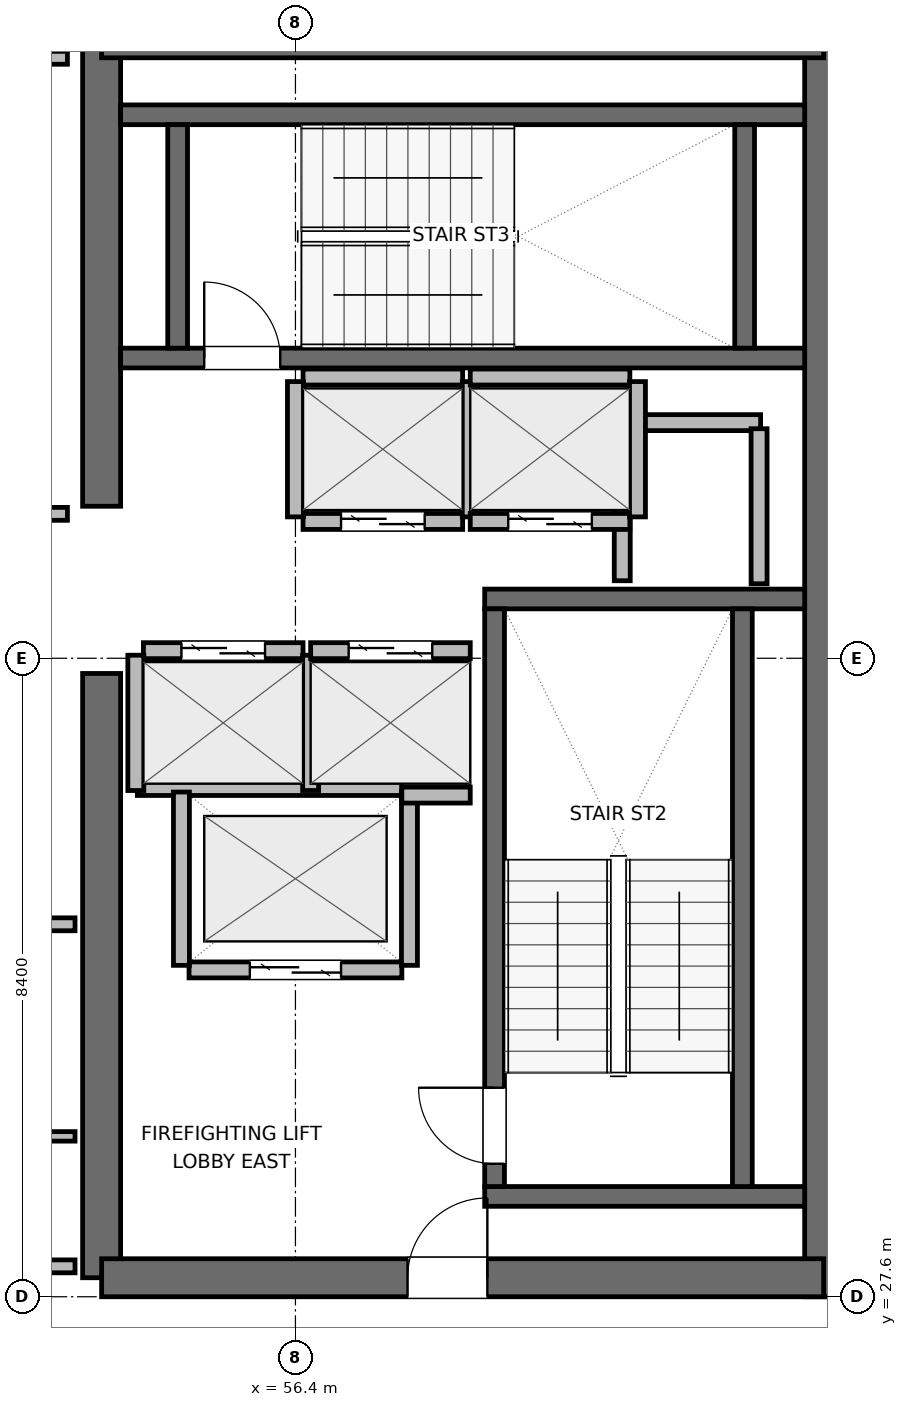
"""IFC4 building model, lengths in metres.
Left out: names, types, materials, properties, quantities, classifications, styles, units other than length and angle.
Written with IfcOpenShell. Run it as: python <this file> out.ifc"""

import sys

from ifc_helpers import new_model, si_unit, direction, frame, frame_2d, origin, place, context, subcontext, project, spatial, rectangle, extrude, element, fill, save


model = new_model("IFC4")
c1 = context("Model", 3, precision=1e-05, world=origin(), true_north=direction((0.0, 1.0)))
c2 = subcontext(c1, "Body", "Model", "MODEL_VIEW")
j1 = project(units=[si_unit("LENGTHUNIT", "METRE"), si_unit("PLANEANGLEUNIT", "RADIAN")], contexts=[c1])
p1 = place(None, origin())
s1 = spatial("IfcSite", under=j1, at=p1, CompositionType="ELEMENT")
p2 = place(p1, origin())
s2 = spatial("IfcBuilding", under=s1, at=p2, CompositionType="ELEMENT")
p3 = place(p2, frame((0.0, 0.0, 262.8)))
s3 = spatial("IfcBuildingStorey", under=s2, at=p3, CompositionType="ELEMENT", Elevation=262.8)
p4 = place(p3, frame((53.85, 27.85, 0.0), z_axis=(0.0, 0.0, 1.0), x_axis=(0.0, 1.0, 0.0)))
e1 = element("IfcWall", 1, at=p4, inside=s3, PredefinedType="SHEAR", context=c2, shape_type="SweptSolid", body=[
    extrude(rectangle(XDim=7.95, YDim=0.5, at=frame_2d((3.975, 0.0))), origin(), (0.0, 0.0, 1.0), 3.9),
])
p5 = place(p3, frame((53.85, 38.0, 0.0), z_axis=(0.0, 0.0, 1.0), x_axis=(0.0, 1.0, 0.0)))
e2 = element("IfcWall", 2, at=p5, inside=s3, PredefinedType="SHEAR", context=c2, shape_type="SweptSolid", body=[
    extrude(rectangle(XDim=6.15, YDim=0.5, at=frame_2d((3.075, 0.0))), origin(), (0.0, 0.0, 1.0), 3.9),
])
p6 = place(p3, frame((63.35, 27.6, 0.0), z_axis=(0.0, 0.0, 1.0), x_axis=(0.0, 1.0, 0.0)))
e3 = element("IfcWall", 3, at=p6, inside=s3, PredefinedType="SHEAR", context=c2, shape_type="SweptSolid", body=[
    extrude(rectangle(XDim=16.8, YDim=0.5, at=frame_2d((8.4, 0.0))), origin(), (0.0, 0.0, 1.0), 3.9),
])
p7 = place(p3, frame((53.85, 27.85, 0.0), z_axis=(0.0, 0.0, 1.0), x_axis=(1.0, 0.0, 0.0)))
e4 = element("IfcWall", 4, at=p7, inside=s3, PredefinedType="SHEAR", context=c2, shape_type="SweptSolid", body=[
    extrude(rectangle(XDim=9.5, YDim=0.5, at=frame_2d((4.75, 0.0))), origin(), (0.0, 0.0, 1.0), 3.9),
])
p8 = place(p7, frame((4.025, 0.0, 0.0)))
e5 = element("IfcOpeningElement", 5, at=p8, cuts=e4, PredefinedType="OPENING", context=c2, shape_type="SweptSolid", body=[
    extrude(rectangle(XDim=1.05, YDim=2.04, at=frame_2d((0.525, 1.02))), frame((0.0, 0.26, 0.0), z_axis=(0.0, -1.0, 0.0), x_axis=(1.0, 0.0, 0.0)), (0.0, 0.0, 1.0), 0.52),
])
p9 = place(p3, frame((53.85, 44.15, 0.0), z_axis=(0.0, 0.0, 1.0), x_axis=(1.0, 0.0, 0.0)))
e6 = element("IfcWall", 6, at=p9, inside=s3, PredefinedType="SHEAR", context=c2, shape_type="SweptSolid", body=[
    extrude(rectangle(XDim=9.5, YDim=0.5, at=frame_2d((4.75, 0.0))), origin(), (0.0, 0.0, 1.0), 3.9),
])
for number, where, z_axis, x_axis in (
    (7, (58.89, 28.92, 0.0), (0.0, 0.0, 1.0), (1.0, 0.0, 0.0)),
    (8, (58.89, 36.78, 0.0), (0.0, 0.0, 1.0), (1.0, 0.0, 0.0)),
):
    element("IfcWall", number, at=place(p3, frame(where, z_axis=z_axis, x_axis=x_axis)), inside=s3, PredefinedType="SHEAR", context=c2, shape_type="SweptSolid", body=[
        extrude(rectangle(XDim=4.21, YDim=0.26, at=frame_2d((2.105, 0.0))), origin(), (0.0, 0.0, 1.0), 3.9),
    ])
p10 = place(p3, frame((59.02, 29.05, 0.0), z_axis=(0.0, 0.0, 1.0), x_axis=(0.0, 1.0, 0.0)))
e9 = element("IfcWall", 9, at=p10, inside=s3, PredefinedType="SHEAR", context=c2, shape_type="SweptSolid", body=[
    extrude(rectangle(XDim=7.6, YDim=0.26, at=frame_2d((3.8, 0.0))), origin(), (0.0, 0.0, 1.0), 3.9),
])
p11 = place(p10, frame((0.3, 0.0, 0.0)))
e10 = element("IfcOpeningElement", 10, at=p11, cuts=e9, PredefinedType="OPENING", context=c2, shape_type="SweptSolid", body=[
    extrude(rectangle(XDim=1.0, YDim=2.04, at=frame_2d((0.5, 1.02))), frame((0.0, 0.14, 0.0), z_axis=(0.0, -1.0, 0.0), x_axis=(1.0, 0.0, 0.0)), (0.0, 0.0, 1.0), 0.28),
])
p12 = place(p3, frame((62.28, 29.05, 0.0), z_axis=(0.0, 0.0, 1.0), x_axis=(0.0, 1.0, 0.0)))
e11 = element("IfcWall", 11, at=p12, inside=s3, PredefinedType="SHEAR", context=c2, shape_type="SweptSolid", body=[
    extrude(rectangle(XDim=7.6, YDim=0.26, at=frame_2d((3.8, 0.0))), origin(), (0.0, 0.0, 1.0), 3.9),
])
p13 = place(p3, frame((54.1, 39.95, 0.0), z_axis=(0.0, 0.0, 1.0), x_axis=(1.0, 0.0, 0.0)))
e12 = element("IfcWall", 12, at=p13, inside=s3, PredefinedType="SHEAR", context=c2, shape_type="SweptSolid", body=[
    extrude(rectangle(XDim=9.0, YDim=0.26, at=frame_2d((4.5, 0.0))), origin(), (0.0, 0.0, 1.0), 3.9),
])
p14 = place(p13, frame((1.1, 0.0, 0.0)))
e13 = element("IfcOpeningElement", 13, at=p14, cuts=e12, PredefinedType="OPENING", context=c2, shape_type="SweptSolid", body=[
    extrude(rectangle(XDim=1.0, YDim=2.04, at=frame_2d((0.5, 1.02))), frame((0.0, 0.14, 0.0), z_axis=(0.0, -1.0, 0.0), x_axis=(1.0, 0.0, 0.0)), (0.0, 0.0, 1.0), 0.28),
])
p15 = place(p3, frame((54.1, 43.15, 0.0), z_axis=(0.0, 0.0, 1.0), x_axis=(1.0, 0.0, 0.0)))
e14 = element("IfcWall", 14, at=p15, inside=s3, PredefinedType="SHEAR", context=c2, shape_type="SweptSolid", body=[
    extrude(rectangle(XDim=9.0, YDim=0.26, at=frame_2d((4.5, 0.0))), origin(), (0.0, 0.0, 1.0), 3.9),
])
for number, where, z_axis, x_axis in (
    (15, (54.85, 40.08, 0.0), (0.0, 0.0, 1.0), (0.0, 1.0, 0.0)),
    (16, (62.31, 40.08, 0.0), (0.0, 0.0, 1.0), (0.0, 1.0, 0.0)),
):
    element("IfcWall", number, at=place(p3, frame(where, z_axis=z_axis, x_axis=x_axis)), inside=s3, PredefinedType="SHEAR", context=c2, shape_type="SweptSolid", body=[
        extrude(rectangle(XDim=2.94, YDim=0.26, at=frame_2d((1.47, 0.0))), origin(), (0.0, 0.0, 1.0), 3.9),
    ])
p16 = place(p3, frame((60.72, 39.1, 0.0), z_axis=(0.0, 0.0, 1.0), x_axis=(1.0, 0.0, 0.0)))
e17 = element("IfcWall", 17, at=p16, inside=s3, PredefinedType="PARTITIONING", context=c2, shape_type="SweptSolid", body=[
    extrude(rectangle(XDim=1.8, YDim=0.21, at=frame_2d((0.9, 0.0))), origin(), (0.0, 0.0, 1.0), 3.68),
])
p17 = place(p3, frame((60.7, 37.02, 0.0), z_axis=(0.0, 0.0, 1.0), x_axis=(0.0, 1.0, 0.0)))
e18 = element("IfcWall", 18, at=p17, inside=s3, PredefinedType="PARTITIONING", context=c2, shape_type="SweptSolid", body=[
    extrude(rectangle(XDim=1.96, YDim=0.21, at=frame_2d((0.98, 0.0))), origin(), (0.0, 0.0, 1.0), 3.68),
])
p18 = place(p3, frame((62.5, 36.98, 0.0), z_axis=(0.0, 0.0, 1.0), x_axis=(0.0, 1.0, 0.0)))
e19 = element("IfcWall", 19, at=p18, inside=s3, PredefinedType="PARTITIONING", context=c2, shape_type="SweptSolid", body=[
    extrude(rectangle(XDim=2.04, YDim=0.21, at=frame_2d((1.02, 0.0))), origin(), (0.0, 0.0, 1.0), 3.68),
])
p19 = place(p3, frame((55.0, 31.9, 0.0), z_axis=(0.0, 0.0, 1.0), x_axis=(1.0, 0.0, 0.0)))
e20 = element("IfcWall", 20, at=p19, inside=s3, PredefinedType="PARTITIONING", context=c2, shape_type="SweptSolid", body=[
    extrude(rectangle(XDim=2.8, YDim=0.21, at=frame_2d((1.4, 0.0))), origin(), (0.0, 0.0, 1.0), 3.68),
])
p20 = place(p19, frame((0.8, 0.0, 0.0)))
e21 = element("IfcOpeningElement", 21, at=p20, cuts=e20, PredefinedType="OPENING", context=c2, shape_type="SweptSolid", body=[
    extrude(rectangle(XDim=1.2, YDim=2.04, at=frame_2d((0.6, 1.02))), frame((0.0, 0.115, 0.0), z_axis=(0.0, -1.0, 0.0), x_axis=(1.0, 0.0, 0.0)), (0.0, 0.0, 1.0), 0.23),
])
p21 = place(p3, frame((54.32, 34.3, 0.0), z_axis=(0.0, 0.0, 1.0), x_axis=(1.0, 0.0, 0.0)))
e22 = element("IfcWall", 22, at=p21, inside=s3, PredefinedType="PARTITIONING", context=c2, shape_type="SweptSolid", body=[
    extrude(rectangle(XDim=3.48, YDim=0.21, at=frame_2d((1.74, 0.0))), origin(), (0.0, 0.0, 1.0), 3.68),
])
for number, where, z_axis, x_axis in (
    (23, (54.9, 31.96, 0.0), (0.0, 0.0, 1.0), (0.0, 1.0, 0.0)),
    (24, (57.9, 31.96, 0.0), (0.0, 0.0, 1.0), (0.0, 1.0, 0.0)),
):
    element("IfcWall", number, at=place(p3, frame(where, z_axis=z_axis, x_axis=x_axis)), inside=s3, PredefinedType="PARTITIONING", context=c2, shape_type="SweptSolid", body=[
        extrude(rectangle(XDim=2.28, YDim=0.21, at=frame_2d((1.14, 0.0))), origin(), (0.0, 0.0, 1.0), 3.68),
    ])
p22 = place(p3, frame((54.4, 36.1, 0.0), z_axis=(0.0, 0.0, 1.0), x_axis=(1.0, 0.0, 0.0)))
e25 = element("IfcWall", 25, at=p22, inside=s3, PredefinedType="PARTITIONING", context=c2, shape_type="SweptSolid", body=[
    extrude(rectangle(XDim=2.1, YDim=0.21, at=frame_2d((1.05, 0.0))), origin(), (0.0, 0.0, 1.0), 3.68),
])
p23 = place(p22, frame((0.5, 0.0, 0.0)))
e26 = element("IfcOpeningElement", 26, at=p23, cuts=e25, PredefinedType="OPENING", context=c2, shape_type="SweptSolid", body=[
    extrude(rectangle(XDim=1.1, YDim=2.04, at=frame_2d((0.55, 1.02))), frame((0.0, 0.115, 0.0), z_axis=(0.0, -1.0, 0.0), x_axis=(1.0, 0.0, 0.0)), (0.0, 0.0, 1.0), 0.23),
])
for number, where, z_axis, x_axis in (
    (27, (54.3, 34.26, 0.0), (0.0, 0.0, 1.0), (0.0, 1.0, 0.0)),
    (28, (56.6, 34.26, 0.0), (0.0, 0.0, 1.0), (0.0, 1.0, 0.0)),
):
    element("IfcWall", number, at=place(p3, frame(where, z_axis=z_axis, x_axis=x_axis)), inside=s3, PredefinedType="PARTITIONING", context=c2, shape_type="SweptSolid", body=[
        extrude(rectangle(XDim=1.78, YDim=0.21, at=frame_2d((0.89, 0.0))), origin(), (0.0, 0.0, 1.0), 3.68),
    ])
p24 = place(p3, frame((56.6, 36.1, 0.0), z_axis=(0.0, 0.0, 1.0), x_axis=(1.0, 0.0, 0.0)))
e29 = element("IfcWall", 29, at=p24, inside=s3, PredefinedType="PARTITIONING", context=c2, shape_type="SweptSolid", body=[
    extrude(rectangle(XDim=2.1, YDim=0.21, at=frame_2d((1.05, 0.0))), origin(), (0.0, 0.0, 1.0), 3.68),
])
p25 = place(p24, frame((0.5, 0.0, 0.0)))
e30 = element("IfcOpeningElement", 30, at=p25, cuts=e29, PredefinedType="OPENING", context=c2, shape_type="SweptSolid", body=[
    extrude(rectangle(XDim=1.1, YDim=2.04, at=frame_2d((0.55, 1.02))), frame((0.0, 0.115, 0.0), z_axis=(0.0, -1.0, 0.0), x_axis=(1.0, 0.0, 0.0)), (0.0, 0.0, 1.0), 0.23),
])
p26 = place(p3, frame((57.8, 34.2, 0.0), z_axis=(0.0, 0.0, 1.0), x_axis=(1.0, 0.0, 0.0)))
e31 = element("IfcWall", 31, at=p26, inside=s3, PredefinedType="PARTITIONING", context=c2, shape_type="SweptSolid", body=[
    extrude(rectangle(XDim=0.9, YDim=0.21, at=frame_2d((0.45, 0.0))), origin(), (0.0, 0.0, 1.0), 3.68),
])
p27 = place(p3, frame((56.5, 37.8, 0.0), z_axis=(0.0, 0.0, 1.0), x_axis=(1.0, 0.0, 0.0)))
e32 = element("IfcWall", 32, at=p27, inside=s3, PredefinedType="PARTITIONING", context=c2, shape_type="SweptSolid", body=[
    extrude(rectangle(XDim=2.1, YDim=0.21, at=frame_2d((1.05, 0.0))), origin(), (0.0, 0.0, 1.0), 3.68),
])
p28 = place(p27, frame((0.5, 0.0, 0.0)))
e33 = element("IfcOpeningElement", 33, at=p28, cuts=e32, PredefinedType="OPENING", context=c2, shape_type="SweptSolid", body=[
    extrude(rectangle(XDim=1.1, YDim=2.04, at=frame_2d((0.55, 1.02))), frame((0.0, 0.115, 0.0), z_axis=(0.0, -1.0, 0.0), x_axis=(1.0, 0.0, 0.0)), (0.0, 0.0, 1.0), 0.23),
])
p29 = place(p3, frame((56.5, 39.7, 0.0), z_axis=(0.0, 0.0, 1.0), x_axis=(1.0, 0.0, 0.0)))
e34 = element("IfcWall", 34, at=p29, inside=s3, PredefinedType="PARTITIONING", context=c2, shape_type="SweptSolid", body=[
    extrude(rectangle(XDim=2.1, YDim=0.21, at=frame_2d((1.05, 0.0))), origin(), (0.0, 0.0, 1.0), 3.68),
])
for number, where, z_axis, x_axis in (
    (35, (56.4, 37.86, 0.0), (0.0, 0.0, 1.0), (0.0, 1.0, 0.0)),
    (36, (58.7, 37.86, 0.0), (0.0, 0.0, 1.0), (0.0, 1.0, 0.0)),
):
    element("IfcWall", number, at=place(p3, frame(where, z_axis=z_axis, x_axis=x_axis)), inside=s3, PredefinedType="PARTITIONING", context=c2, shape_type="SweptSolid", body=[
        extrude(rectangle(XDim=1.78, YDim=0.21, at=frame_2d((0.89, 0.0))), origin(), (0.0, 0.0, 1.0), 3.68),
    ])
p30 = place(p3, frame((58.7, 37.8, 0.0), z_axis=(0.0, 0.0, 1.0), x_axis=(1.0, 0.0, 0.0)))
e37 = element("IfcWall", 37, at=p30, inside=s3, PredefinedType="PARTITIONING", context=c2, shape_type="SweptSolid", body=[
    extrude(rectangle(XDim=2.1, YDim=0.21, at=frame_2d((1.05, 0.0))), origin(), (0.0, 0.0, 1.0), 3.68),
])
p31 = place(p30, frame((0.5, 0.0, 0.0)))
e38 = element("IfcOpeningElement", 38, at=p31, cuts=e37, PredefinedType="OPENING", context=c2, shape_type="SweptSolid", body=[
    extrude(rectangle(XDim=1.1, YDim=2.04, at=frame_2d((0.55, 1.02))), frame((0.0, 0.115, 0.0), z_axis=(0.0, -1.0, 0.0), x_axis=(1.0, 0.0, 0.0)), (0.0, 0.0, 1.0), 0.23),
])
p32 = place(p3, frame((58.7, 39.7, 0.0), z_axis=(0.0, 0.0, 1.0), x_axis=(1.0, 0.0, 0.0)))
e39 = element("IfcWall", 39, at=p32, inside=s3, PredefinedType="PARTITIONING", context=c2, shape_type="SweptSolid", body=[
    extrude(rectangle(XDim=2.1, YDim=0.21, at=frame_2d((1.05, 0.0))), origin(), (0.0, 0.0, 1.0), 3.68),
])
p33 = place(p3, frame((60.9, 37.86, 0.0), z_axis=(0.0, 0.0, 1.0), x_axis=(0.0, 1.0, 0.0)))
e40 = element("IfcWall", 40, at=p33, inside=s3, PredefinedType="PARTITIONING", context=c2, shape_type="SweptSolid", body=[
    extrude(rectangle(XDim=1.78, YDim=0.21, at=frame_2d((0.89, 0.0))), origin(), (0.0, 0.0, 1.0), 3.68),
])
p34 = place(p3, frame((49.287, 28.0, 0.0), z_axis=(0.0, 0.0, 1.0), x_axis=(1.0, 0.0, 0.0)))
e41 = element("IfcWall", 41, at=p34, inside=s3, PredefinedType="PARTITIONING", context=c2, shape_type="SweptSolid", body=[
    extrude(rectangle(XDim=4.213, YDim=0.17, at=frame_2d((2.106, 0.0))), origin(), (0.0, 0.0, 1.0), 2.765),
])
p35 = place(p3, frame((52.2, 32.5, 0.0), z_axis=(0.0, 0.0, 1.0), x_axis=(1.0, 0.0, 0.0)))
e42 = element("IfcWall", 42, at=p35, inside=s3, PredefinedType="PARTITIONING", context=c2, shape_type="SweptSolid", body=[
    extrude(rectangle(XDim=1.3, YDim=0.17, at=frame_2d((0.65, 0.0))), origin(), (0.0, 0.0, 1.0), 3.68),
])
p36 = place(p3, frame((49.287, 29.71, 0.0), z_axis=(0.0, 0.0, 1.0), x_axis=(1.0, 0.0, 0.0)))
e43 = element("IfcWall", 43, at=p36, inside=s3, PredefinedType="PARTITIONING", context=c2, shape_type="SweptSolid", body=[
    extrude(rectangle(XDim=4.213, YDim=0.125, at=frame_2d((2.106, 0.0))), origin(), (0.0, 0.0, 1.0), 3.68),
])
p37 = place(p3, frame((49.287, 37.9, 0.0), z_axis=(0.0, 0.0, 1.0), x_axis=(1.0, 0.0, 0.0)))
e44 = element("IfcWall", 44, at=p37, inside=s3, PredefinedType="PARTITIONING", context=c2, shape_type="SweptSolid", body=[
    extrude(rectangle(XDim=4.113, YDim=0.17, at=frame_2d((2.056, 0.0))), origin(), (0.0, 0.0, 1.0), 3.68),
])
p38 = place(p3, frame((49.287, 43.9, 0.0), z_axis=(0.0, 0.0, 1.0), x_axis=(1.0, 0.0, 0.0)))
e45 = element("IfcWall", 45, at=p38, inside=s3, PredefinedType="PARTITIONING", context=c2, shape_type="SweptSolid", body=[
    extrude(rectangle(XDim=4.113, YDim=0.17, at=frame_2d((2.056, 0.0))), origin(), (0.0, 0.0, 1.0), 2.765),
])
p39 = place(p11, origin())
e46 = element("IfcDoor", 46, at=p39, inside=s3, OperationType="SINGLE_SWING_RIGHT", PredefinedType="DOOR", context=c2, shape_type="SweptSolid", body=[
    extrude(rectangle(XDim=1.0, YDim=2.04, at=frame_2d((0.5, 1.02))), frame((0.0, 0.025, 0.0), z_axis=(0.0, -1.0, 0.0), x_axis=(1.0, 0.0, 0.0)), (0.0, 0.0, 1.0), 0.05),
])
fill(e10, e46)
p40 = place(p14, origin())
e47 = element("IfcDoor", 47, at=p40, inside=s3, OperationType="SINGLE_SWING_LEFT", PredefinedType="DOOR", context=c2, shape_type="SweptSolid", body=[
    extrude(rectangle(XDim=1.0, YDim=2.04, at=frame_2d((0.5, 1.02))), frame((0.0, 0.025, 0.0), z_axis=(0.0, -1.0, 0.0), x_axis=(1.0, 0.0, 0.0)), (0.0, 0.0, 1.0), 0.05),
])
fill(e13, e47)
p41 = place(p20, origin())
e48 = element("IfcDoor", 48, at=p41, inside=s3, OperationType="DOUBLE_DOOR_SLIDING", PredefinedType="DOOR", context=c2, shape_type="SweptSolid", body=[
    extrude(rectangle(XDim=1.2, YDim=2.04, at=frame_2d((0.6, 1.02))), frame((0.0, 0.025, 0.0), z_axis=(0.0, -1.0, 0.0), x_axis=(1.0, 0.0, 0.0)), (0.0, 0.0, 1.0), 0.05),
])
fill(e21, e48)
p42 = place(p23, origin())
e49 = element("IfcDoor", 49, at=p42, inside=s3, OperationType="DOUBLE_DOOR_SLIDING", PredefinedType="DOOR", context=c2, shape_type="SweptSolid", body=[
    extrude(rectangle(XDim=1.1, YDim=2.04, at=frame_2d((0.55, 1.02))), frame((0.0, 0.025, 0.0), z_axis=(0.0, -1.0, 0.0), x_axis=(1.0, 0.0, 0.0)), (0.0, 0.0, 1.0), 0.05),
])
fill(e26, e49)
p43 = place(p25, origin())
e50 = element("IfcDoor", 50, at=p43, inside=s3, OperationType="DOUBLE_DOOR_SLIDING", PredefinedType="DOOR", context=c2, shape_type="SweptSolid", body=[
    extrude(rectangle(XDim=1.1, YDim=2.04, at=frame_2d((0.55, 1.02))), frame((0.0, 0.025, 0.0), z_axis=(0.0, -1.0, 0.0), x_axis=(1.0, 0.0, 0.0)), (0.0, 0.0, 1.0), 0.05),
])
fill(e30, e50)
p44 = place(p28, origin())
e51 = element("IfcDoor", 51, at=p44, inside=s3, OperationType="DOUBLE_DOOR_SLIDING", PredefinedType="DOOR", context=c2, shape_type="SweptSolid", body=[
    extrude(rectangle(XDim=1.1, YDim=2.04, at=frame_2d((0.55, 1.02))), frame((0.0, 0.025, 0.0), z_axis=(0.0, -1.0, 0.0), x_axis=(1.0, 0.0, 0.0)), (0.0, 0.0, 1.0), 0.05),
])
fill(e33, e51)
p45 = place(p31, origin())
e52 = element("IfcDoor", 52, at=p45, inside=s3, OperationType="DOUBLE_DOOR_SLIDING", PredefinedType="DOOR", context=c2, shape_type="SweptSolid", body=[
    extrude(rectangle(XDim=1.1, YDim=2.04, at=frame_2d((0.55, 1.02))), frame((0.0, 0.025, 0.0), z_axis=(0.0, -1.0, 0.0), x_axis=(1.0, 0.0, 0.0)), (0.0, 0.0, 1.0), 0.05),
])
fill(e38, e52)
p46 = place(p8, origin())
e53 = element("IfcDoor", 53, at=p46, inside=s3, OperationType="SINGLE_SWING_RIGHT", PredefinedType="DOOR", context=c2, shape_type="SweptSolid", body=[
    extrude(rectangle(XDim=1.05, YDim=2.04, at=frame_2d((0.525, 1.02))), frame((0.0, 0.025, 0.0), z_axis=(0.0, -1.0, 0.0), x_axis=(1.0, 0.0, 0.0)), (0.0, 0.0, 1.0), 0.05),
])
fill(e5, e53)
save(model, sys.argv[1])
